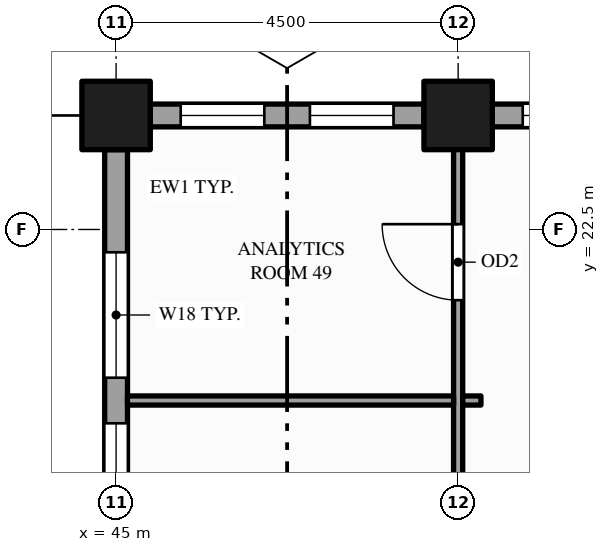
"""IFC4 building model, lengths in metres.
Left out: names, types, materials, properties, quantities, classifications, styles, units other than length and angle.
Written with IfcOpenShell. Run it as: python <this file> out.ifc"""

import sys

from ifc_helpers import new_model, si_unit, direction, frame, frame_2d, origin, origin_2d, place, context, subcontext, project, spatial, rectangle, hollow_rectangle, extrude, element, fill, save


model = new_model("IFC4")
c1 = context("Model", 3, precision=1e-05, world=origin(), true_north=direction((0.0, 1.0)))
c2 = subcontext(c1, "Body", "Model", "MODEL_VIEW")
j1 = project(units=[si_unit("LENGTHUNIT", "METRE"), si_unit("PLANEANGLEUNIT", "RADIAN")], contexts=[c1])
p1 = place(None, origin())
s1 = spatial("IfcSite", under=j1, at=p1, CompositionType="ELEMENT")
p2 = place(p1, origin())
s2 = spatial("IfcBuilding", under=s1, at=p2, CompositionType="ELEMENT")
p3 = place(p2, frame((0.0, 0.0, 147.0)))
s3 = spatial("IfcBuildingStorey", under=s2, at=p3, CompositionType="ELEMENT", Elevation=147.0)
for number, where, z_axis, x_axis in (
    (1, (45.0, 24.0, -0.15), (0.0, 0.0, 1.0), (1.0, 0.0, 0.0)),
    (2, (49.5, 24.0, -0.15), (0.0, 0.0, 1.0), (1.0, 0.0, 0.0)),
):
    element("IfcColumn", number, at=place(p3, frame(where, z_axis=z_axis, x_axis=x_axis)), inside=s3, PredefinedType="COLUMN", context=c2, shape_type="SweptSolid", body=[
        extrude(hollow_rectangle(XDim=0.9, YDim=0.9, WallThickness=0.045, at=origin_2d()), origin(), (0.0, 0.0, 1.0), 4.0),
    ])
p4 = place(p3, frame((53.55, 24.0, 0.0), z_axis=(0.0, 0.0, 1.0), x_axis=(-1.0, 0.0, 0.0)))
e3 = element("IfcWall", 3, at=p4, inside=s3, PredefinedType="STANDARD", context=c2, shape_type="SweptSolid", body=[
    extrude(rectangle(XDim=3.6, YDim=0.3, at=frame_2d((1.8, 0.0))), origin(), (0.0, 0.0, 1.0), 2.87),
])
p5 = place(p4, frame((0.4, 0.0, 0.9)))
e4 = element("IfcOpeningElement", 4, at=p5, cuts=e3, PredefinedType="OPENING", context=c2, shape_type="SweptSolid", body=[
    extrude(rectangle(XDim=1.1, YDim=1.75, at=frame_2d((0.55, 0.875))), frame((0.0, 0.16, 0.0), z_axis=(0.0, -1.0, 0.0), x_axis=(1.0, 0.0, 0.0)), (0.0, 0.0, 1.0), 0.32),
])
p6 = place(p4, frame((2.1, 0.0, 0.9)))
e5 = element("IfcOpeningElement", 5, at=p6, cuts=e3, PredefinedType="OPENING", context=c2, shape_type="SweptSolid", body=[
    extrude(rectangle(XDim=1.1, YDim=1.75, at=frame_2d((0.55, 0.875))), frame((0.0, 0.16, 0.0), z_axis=(0.0, -1.0, 0.0), x_axis=(1.0, 0.0, 0.0)), (0.0, 0.0, 1.0), 0.32),
])
p7 = place(p3, frame((49.05, 24.0, 0.0), z_axis=(0.0, 0.0, 1.0), x_axis=(-1.0, 0.0, 0.0)))
e6 = element("IfcWall", 6, at=p7, inside=s3, PredefinedType="STANDARD", context=c2, shape_type="SweptSolid", body=[
    extrude(rectangle(XDim=3.6, YDim=0.3, at=frame_2d((1.8, 0.0))), origin(), (0.0, 0.0, 1.0), 2.87),
])
p8 = place(p7, frame((0.4, 0.0, 0.9)))
e7 = element("IfcOpeningElement", 7, at=p8, cuts=e6, PredefinedType="OPENING", context=c2, shape_type="SweptSolid", body=[
    extrude(rectangle(XDim=1.1, YDim=1.75, at=frame_2d((0.55, 0.875))), frame((0.0, 0.16, 0.0), z_axis=(0.0, -1.0, 0.0), x_axis=(1.0, 0.0, 0.0)), (0.0, 0.0, 1.0), 0.32),
])
p9 = place(p7, frame((2.1, 0.0, 0.9)))
e8 = element("IfcOpeningElement", 8, at=p9, cuts=e6, PredefinedType="OPENING", context=c2, shape_type="SweptSolid", body=[
    extrude(rectangle(XDim=1.1, YDim=1.75, at=frame_2d((0.55, 0.875))), frame((0.0, 0.16, 0.0), z_axis=(0.0, -1.0, 0.0), x_axis=(1.0, 0.0, 0.0)), (0.0, 0.0, 1.0), 0.32),
])
p10 = place(p3, frame((45.0, 23.55, 0.0), z_axis=(0.0, 0.0, 1.0), x_axis=(0.0, -1.0, 0.0)))
e9 = element("IfcWall", 9, at=p10, inside=s3, PredefinedType="STANDARD", context=c2, shape_type="SweptSolid", body=[
    extrude(rectangle(XDim=21.6, YDim=0.3, at=frame_2d((10.8, 0.0))), origin(), (0.0, 0.0, 1.0), 2.87),
])
p11 = place(p10, frame((1.35, 0.0, 0.9)))
e10 = element("IfcOpeningElement", 10, at=p11, cuts=e9, PredefinedType="OPENING", context=c2, shape_type="SweptSolid", body=[
    extrude(rectangle(XDim=1.65, YDim=1.75, at=frame_2d((0.825, 0.875))), frame((0.0, 0.16, 0.0), z_axis=(0.0, -1.0, 0.0), x_axis=(1.0, 0.0, 0.0)), (0.0, 0.0, 1.0), 0.32),
])
p12 = place(p10, frame((3.6, 0.0, 0.9)))
e11 = element("IfcOpeningElement", 11, at=p12, cuts=e9, PredefinedType="OPENING", context=c2, shape_type="SweptSolid", body=[
    extrude(rectangle(XDim=1.65, YDim=1.75, at=frame_2d((0.825, 0.875))), frame((0.0, 0.16, 0.0), z_axis=(0.0, -1.0, 0.0), x_axis=(1.0, 0.0, 0.0)), (0.0, 0.0, 1.0), 0.32),
])
p13 = place(p10, frame((5.85, 0.0, 0.9)))
e12 = element("IfcOpeningElement", 12, at=p13, cuts=e9, PredefinedType="OPENING", context=c2, shape_type="SweptSolid", body=[
    extrude(rectangle(XDim=1.65, YDim=1.75, at=frame_2d((0.825, 0.875))), frame((0.0, 0.16, 0.0), z_axis=(0.0, -1.0, 0.0), x_axis=(1.0, 0.0, 0.0)), (0.0, 0.0, 1.0), 0.32),
])
p14 = place(p10, frame((8.1, 0.0, 0.9)))
e13 = element("IfcOpeningElement", 13, at=p14, cuts=e9, PredefinedType="OPENING", context=c2, shape_type="SweptSolid", body=[
    extrude(rectangle(XDim=1.65, YDim=1.75, at=frame_2d((0.825, 0.875))), frame((0.0, 0.16, 0.0), z_axis=(0.0, -1.0, 0.0), x_axis=(1.0, 0.0, 0.0)), (0.0, 0.0, 1.0), 0.32),
])
p15 = place(p10, frame((10.35, 0.0, 0.9)))
e14 = element("IfcOpeningElement", 14, at=p15, cuts=e9, PredefinedType="OPENING", context=c2, shape_type="SweptSolid", body=[
    extrude(rectangle(XDim=1.65, YDim=1.75, at=frame_2d((0.825, 0.875))), frame((0.0, 0.16, 0.0), z_axis=(0.0, -1.0, 0.0), x_axis=(1.0, 0.0, 0.0)), (0.0, 0.0, 1.0), 0.32),
])
p16 = place(p10, frame((12.6, 0.0, 0.9)))
e15 = element("IfcOpeningElement", 15, at=p16, cuts=e9, PredefinedType="OPENING", context=c2, shape_type="SweptSolid", body=[
    extrude(rectangle(XDim=1.65, YDim=1.75, at=frame_2d((0.825, 0.875))), frame((0.0, 0.16, 0.0), z_axis=(0.0, -1.0, 0.0), x_axis=(1.0, 0.0, 0.0)), (0.0, 0.0, 1.0), 0.32),
])
p17 = place(p10, frame((14.85, 0.0, 0.9)))
e16 = element("IfcOpeningElement", 16, at=p17, cuts=e9, PredefinedType="OPENING", context=c2, shape_type="SweptSolid", body=[
    extrude(rectangle(XDim=1.65, YDim=1.75, at=frame_2d((0.825, 0.875))), frame((0.0, 0.16, 0.0), z_axis=(0.0, -1.0, 0.0), x_axis=(1.0, 0.0, 0.0)), (0.0, 0.0, 1.0), 0.32),
])
p18 = place(p10, frame((17.1, 0.0, 0.9)))
e17 = element("IfcOpeningElement", 17, at=p18, cuts=e9, PredefinedType="OPENING", context=c2, shape_type="SweptSolid", body=[
    extrude(rectangle(XDim=1.65, YDim=1.75, at=frame_2d((0.825, 0.875))), frame((0.0, 0.16, 0.0), z_axis=(0.0, -1.0, 0.0), x_axis=(1.0, 0.0, 0.0)), (0.0, 0.0, 1.0), 0.32),
])
p19 = place(p10, frame((19.35, 0.0, 0.9)))
e18 = element("IfcOpeningElement", 18, at=p19, cuts=e9, PredefinedType="OPENING", context=c2, shape_type="SweptSolid", body=[
    extrude(rectangle(XDim=1.65, YDim=1.75, at=frame_2d((0.825, 0.875))), frame((0.0, 0.16, 0.0), z_axis=(0.0, -1.0, 0.0), x_axis=(1.0, 0.0, 0.0)), (0.0, 0.0, 1.0), 0.32),
])
p20 = place(p3, frame((49.5, 1.65, 0.0), z_axis=(0.0, 0.0, 1.0), x_axis=(0.0, 1.0, 0.0)))
e19 = element("IfcWall", 19, at=p20, inside=s3, PredefinedType="PARTITIONING", context=c2, shape_type="SweptSolid", body=[
    extrude(rectangle(XDim=22.2, YDim=0.12, at=frame_2d((11.1, 0.0))), origin(), (0.0, 0.0, 1.0), 2.87),
])
p21 = place(p20, frame((0.85, 0.0, 0.0)))
e20 = element("IfcOpeningElement", 20, at=p21, cuts=e19, PredefinedType="OPENING", context=c2, shape_type="SweptSolid", body=[
    extrude(rectangle(XDim=0.9, YDim=2.1, at=frame_2d((0.45, 1.05))), frame((0.0, 0.07, 0.0), z_axis=(0.0, -1.0, 0.0), x_axis=(1.0, 0.0, 0.0)), (0.0, 0.0, 1.0), 0.14),
])
p22 = place(p20, frame((3.525, 0.0, 0.0)))
e21 = element("IfcOpeningElement", 21, at=p22, cuts=e19, PredefinedType="OPENING", context=c2, shape_type="SweptSolid", body=[
    extrude(rectangle(XDim=0.9, YDim=2.1, at=frame_2d((0.45, 1.05))), frame((0.0, 0.07, 0.0), z_axis=(0.0, -1.0, 0.0), x_axis=(1.0, 0.0, 0.0)), (0.0, 0.0, 1.0), 0.14),
])
p23 = place(p20, frame((5.35, 0.0, 0.0)))
e22 = element("IfcOpeningElement", 22, at=p23, cuts=e19, PredefinedType="OPENING", context=c2, shape_type="SweptSolid", body=[
    extrude(rectangle(XDim=1.0, YDim=2.1, at=frame_2d((0.5, 1.05))), frame((0.0, 0.07, 0.0), z_axis=(0.0, -1.0, 0.0), x_axis=(1.0, 0.0, 0.0)), (0.0, 0.0, 1.0), 0.14),
])
p24 = place(p20, frame((10.225, 0.0, 0.0)))
e23 = element("IfcOpeningElement", 23, at=p24, cuts=e19, PredefinedType="OPENING", context=c2, shape_type="SweptSolid", body=[
    extrude(rectangle(XDim=1.0, YDim=2.1, at=frame_2d((0.5, 1.05))), frame((0.0, 0.07, 0.0), z_axis=(0.0, -1.0, 0.0), x_axis=(1.0, 0.0, 0.0)), (0.0, 0.0, 1.0), 0.14),
])
p25 = place(p20, frame((15.85, 0.0, 0.0)))
e24 = element("IfcOpeningElement", 24, at=p25, cuts=e19, PredefinedType="OPENING", context=c2, shape_type="SweptSolid", body=[
    extrude(rectangle(XDim=1.0, YDim=2.1, at=frame_2d((0.5, 1.05))), frame((0.0, 0.07, 0.0), z_axis=(0.0, -1.0, 0.0), x_axis=(1.0, 0.0, 0.0)), (0.0, 0.0, 1.0), 0.14),
])
p26 = place(p20, frame((19.92, 0.0, 0.0)))
e25 = element("IfcOpeningElement", 25, at=p26, cuts=e19, PredefinedType="OPENING", context=c2, shape_type="SweptSolid", body=[
    extrude(rectangle(XDim=1.0, YDim=2.1, at=frame_2d((0.5, 1.05))), frame((0.0, 0.07, 0.0), z_axis=(0.0, -1.0, 0.0), x_axis=(1.0, 0.0, 0.0)), (0.0, 0.0, 1.0), 0.14),
])
p27 = place(p3, frame((45.15, 20.25, 0.0), z_axis=(0.0, 0.0, 1.0), x_axis=(1.0, 0.0, 0.0)))
e26 = element("IfcWall", 26, at=p27, inside=s3, PredefinedType="PARTITIONING", context=c2, shape_type="SweptSolid", body=[
    extrude(rectangle(XDim=4.29, YDim=0.12, at=frame_2d((2.145, 0.0))), origin(), (0.0, 0.0, 1.0), 2.87),
])
p28 = place(p3, frame((49.56, 20.25, 0.0), z_axis=(0.0, 0.0, 1.0), x_axis=(1.0, 0.0, 0.0)))
e27 = element("IfcWall", 27, at=p28, inside=s3, PredefinedType="PARTITIONING", context=c2, shape_type="SweptSolid", body=[
    extrude(rectangle(XDim=0.24, YDim=0.12, at=frame_2d((0.12, 0.0))), origin(), (0.0, 0.0, 1.0), 2.87),
])
p29 = place(p6, origin())
e28 = element("IfcWindow", 28, at=p29, inside=s3, PartitioningType="SINGLE_PANEL", PredefinedType="WINDOW", context=c2, shape_type="SweptSolid", body=[
    extrude(rectangle(XDim=1.1, YDim=1.75, at=frame_2d((0.55, 0.875))), frame((0.0, 0.03, 0.0), z_axis=(0.0, -1.0, 0.0), x_axis=(1.0, 0.0, 0.0)), (0.0, 0.0, 1.0), 0.06),
])
fill(e5, e28)
p30 = place(p8, origin())
e29 = element("IfcWindow", 29, at=p30, inside=s3, PartitioningType="SINGLE_PANEL", PredefinedType="WINDOW", context=c2, shape_type="SweptSolid", body=[
    extrude(rectangle(XDim=1.1, YDim=1.75, at=frame_2d((0.55, 0.875))), frame((0.0, 0.03, 0.0), z_axis=(0.0, -1.0, 0.0), x_axis=(1.0, 0.0, 0.0)), (0.0, 0.0, 1.0), 0.06),
])
fill(e7, e29)
p31 = place(p9, origin())
e30 = element("IfcWindow", 30, at=p31, inside=s3, PartitioningType="SINGLE_PANEL", PredefinedType="WINDOW", context=c2, shape_type="SweptSolid", body=[
    extrude(rectangle(XDim=1.1, YDim=1.75, at=frame_2d((0.55, 0.875))), frame((0.0, 0.03, 0.0), z_axis=(0.0, -1.0, 0.0), x_axis=(1.0, 0.0, 0.0)), (0.0, 0.0, 1.0), 0.06),
])
fill(e8, e30)
p32 = place(p11, origin())
e31 = element("IfcWindow", 31, at=p32, inside=s3, PartitioningType="SINGLE_PANEL", PredefinedType="WINDOW", context=c2, shape_type="SweptSolid", body=[
    extrude(rectangle(XDim=1.65, YDim=1.75, at=frame_2d((0.825, 0.875))), frame((0.0, 0.03, 0.0), z_axis=(0.0, -1.0, 0.0), x_axis=(1.0, 0.0, 0.0)), (0.0, 0.0, 1.0), 0.06),
])
fill(e10, e31)
p33 = place(p12, origin())
e32 = element("IfcWindow", 32, at=p33, inside=s3, PartitioningType="SINGLE_PANEL", PredefinedType="WINDOW", context=c2, shape_type="SweptSolid", body=[
    extrude(rectangle(XDim=1.65, YDim=1.75, at=frame_2d((0.825, 0.875))), frame((0.0, 0.03, 0.0), z_axis=(0.0, -1.0, 0.0), x_axis=(1.0, 0.0, 0.0)), (0.0, 0.0, 1.0), 0.06),
])
fill(e11, e32)
p34 = place(p26, origin())
e33 = element("IfcDoor", 33, at=p34, inside=s3, OperationType="SINGLE_SWING_RIGHT", PredefinedType="DOOR", context=c2, shape_type="SweptSolid", body=[
    extrude(rectangle(XDim=1.0, YDim=2.1, at=frame_2d((0.5, 1.05))), frame((0.0, 0.025, 0.0), z_axis=(0.0, -1.0, 0.0), x_axis=(1.0, 0.0, 0.0)), (0.0, 0.0, 1.0), 0.05),
])
fill(e25, e33)
save(model, sys.argv[1])
